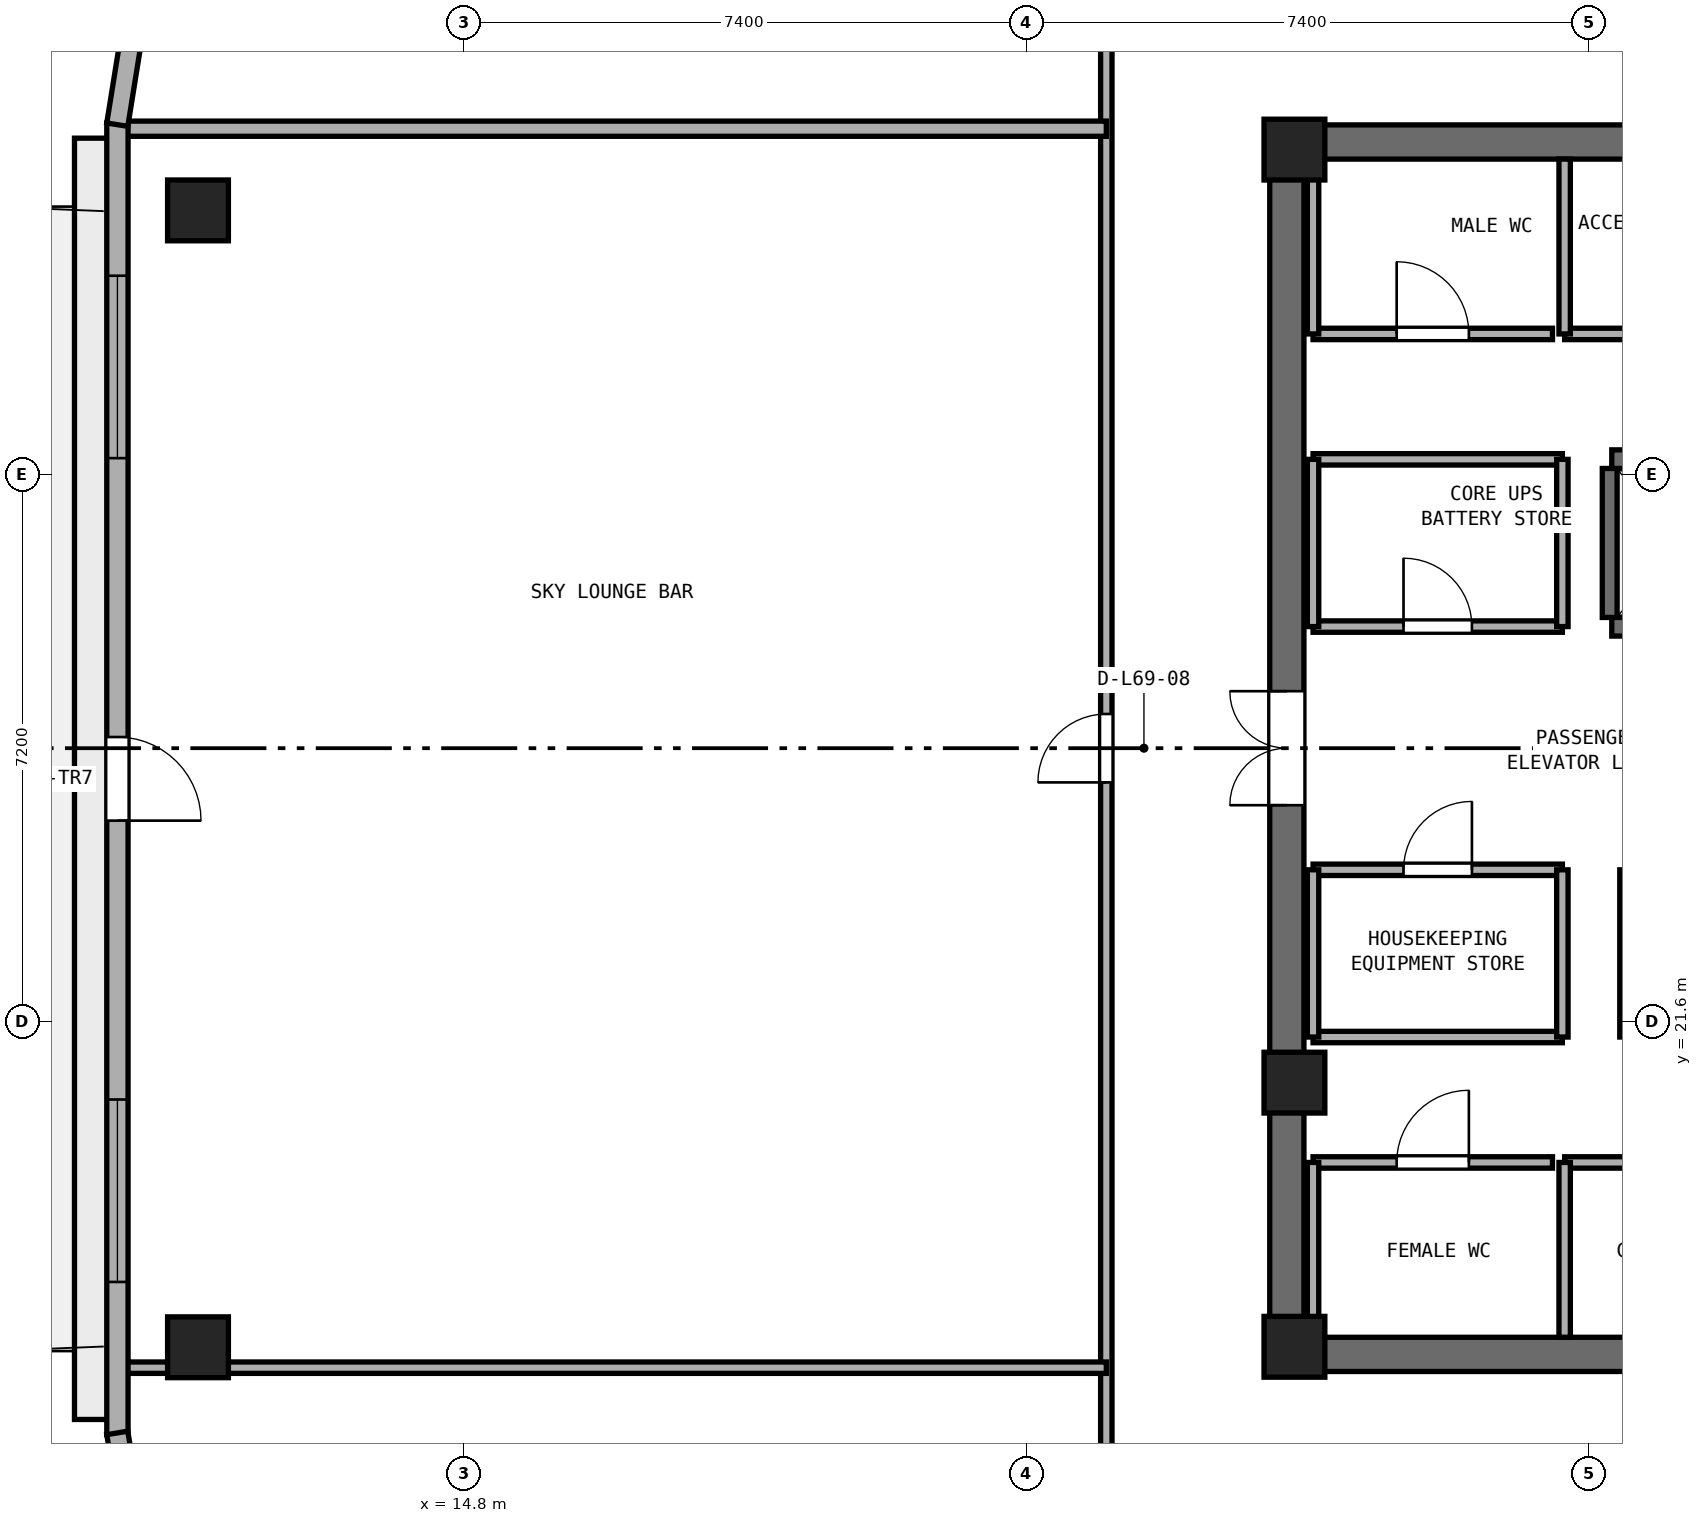
"""IFC4 building model, lengths in metres.
Left out: names, types, materials, properties, quantities, classifications, styles, units other than length and angle.
Written with IfcOpenShell. Run it as: python <this file> out.ifc"""

import sys

from ifc_helpers import new_model, si_unit, direction, frame, frame_2d, origin, origin_2d, place, context, subcontext, project, spatial, rectangle, extrude, element, fill, save


model = new_model("IFC4")
c1 = context("Model", 3, precision=1e-05, world=origin(), true_north=direction((0.0, 1.0)))
c2 = subcontext(c1, "Body", "Model", "MODEL_VIEW")
j1 = project(units=[si_unit("LENGTHUNIT", "METRE"), si_unit("PLANEANGLEUNIT", "RADIAN")], contexts=[c1])
p1 = place(None, origin())
s1 = spatial("IfcSite", under=j1, at=p1, CompositionType="ELEMENT")
p2 = place(p1, origin())
s2 = spatial("IfcBuilding", under=s1, at=p2, CompositionType="ELEMENT")
p3 = place(p2, frame((0.0, 0.0, 270.6)))
s3 = spatial("IfcBuildingStorey", under=s2, at=p3, CompositionType="ELEMENT", Elevation=270.6)
for number, where, z_axis, x_axis in (
    (1, (25.4, 17.225, 0.0), (0.0, 0.0, 1.0), (1.0, 0.0, 0.0)),
    (2, (25.4, 33.175, 0.0), (0.0, 0.0, 1.0), (1.0, 0.0, 0.0)),
):
    element("IfcWall", number, at=place(p3, frame(where, z_axis=z_axis, x_axis=x_axis)), inside=s3, PredefinedType="SHEAR", context=c2, shape_type="SweptSolid", body=[
        extrude(rectangle(XDim=23.2, YDim=0.45, at=frame_2d((11.6, 0.0))), origin(), (0.0, 0.0, 1.0), 3.54),
    ])
p4 = place(p3, frame((25.625, 17.45, 0.0), z_axis=(0.0, 0.0, 1.0), x_axis=(0.0, 1.0, 0.0)))
e3 = element("IfcWall", 3, at=p4, inside=s3, PredefinedType="SHEAR", context=c2, shape_type="SweptSolid", body=[
    extrude(rectangle(XDim=15.5, YDim=0.45, at=frame_2d((7.75, 0.0))), origin(), (0.0, 0.0, 1.0), 3.54),
])
p5 = place(p4, frame((7.0, 0.0, 0.0)))
e4 = element("IfcOpeningElement", 4, at=p5, cuts=e3, PredefinedType="OPENING", context=c2, shape_type="SweptSolid", body=[
    extrude(rectangle(XDim=1.5, YDim=2.15, at=frame_2d((0.75, 1.075))), frame((0.0, 0.235, 0.0), z_axis=(0.0, -1.0, 0.0), x_axis=(1.0, 0.0, 0.0)), (0.0, 0.0, 1.0), 0.47),
])
for number, where, z_axis, x_axis in (
    (5, (25.725, 17.325, 0.0), (0.0, 0.0, 1.0), (1.0, 0.0, 0.0)),
    (6, (25.725, 33.075, 0.0), (0.0, 0.0, 1.0), (1.0, 0.0, 0.0)),
    (7, (25.725, 20.8, 0.0), (0.0, 0.0, 1.0), (1.0, 0.0, 0.0)),
):
    element("IfcColumn", number, at=place(p3, frame(where, z_axis=z_axis, x_axis=x_axis)), inside=s3, PredefinedType="PILASTER", context=c2, shape_type="SweptSolid", body=[
        extrude(rectangle(XDim=0.8, YDim=0.8, at=origin_2d()), origin(), (0.0, 0.0, 1.0), 3.8),
    ])
for number, where, z_axis, x_axis in (
    (8, (11.3, 32.275, 0.0), (0.0, 0.0, 1.0), (1.0, 0.0, 0.0)),
    (9, (11.3, 17.319, 0.0), (0.0, 0.0, 1.0), (1.0, 0.0, 0.0)),
):
    element("IfcColumn", number, at=place(p3, frame(where, z_axis=z_axis, x_axis=x_axis)), inside=s3, PredefinedType="COLUMN", context=c2, shape_type="SweptSolid", body=[
        extrude(rectangle(XDim=0.8, YDim=0.8, at=origin_2d()), origin(), (0.0, 0.0, 1.0), 3.8),
    ])
p6 = place(p3, frame((29.9, 26.8, 0.0), z_axis=(0.0, 0.0, 1.0), x_axis=(1.0, 0.0, 0.0)))
e10 = element("IfcWall", 10, at=p6, inside=s3, PredefinedType="SHEAR", context=c2, shape_type="SweptSolid", body=[
    extrude(rectangle(XDim=1.72, YDim=0.25, at=frame_2d((0.86, 0.0))), origin(), (0.0, 0.0, 1.0), 3.54),
])
p7 = place(p6, frame((0.31, 0.0, 0.0)))
e11 = element("IfcOpeningElement", 11, at=p7, cuts=e10, PredefinedType="OPENING", context=c2, shape_type="SweptSolid", body=[
    extrude(rectangle(XDim=1.1, YDim=2.15, at=frame_2d((0.55, 1.075))), frame((0.0, 0.135, 0.0), z_axis=(0.0, -1.0, 0.0), x_axis=(1.0, 0.0, 0.0)), (0.0, 0.0, 1.0), 0.27),
])
p8 = place(p3, frame((29.9, 29.0, 0.0), z_axis=(0.0, 0.0, 1.0), x_axis=(1.0, 0.0, 0.0)))
e12 = element("IfcWall", 12, at=p8, inside=s3, PredefinedType="SHEAR", context=c2, shape_type="SweptSolid", body=[
    extrude(rectangle(XDim=1.72, YDim=0.25, at=frame_2d((0.86, 0.0))), origin(), (0.0, 0.0, 1.0), 3.54),
])
p9 = place(p3, frame((29.9, 26.92, 0.0), z_axis=(0.0, 0.0, 1.0), x_axis=(0.0, 1.0, 0.0)))
e13 = element("IfcWall", 13, at=p9, inside=s3, PredefinedType="SHEAR", context=c2, shape_type="SweptSolid", body=[
    extrude(rectangle(XDim=1.96, YDim=0.25, at=frame_2d((0.98, 0.0))), origin(), (0.0, 0.0, 1.0), 3.54),
])
p10 = place(p3, frame((25.97, 30.65, 0.0), z_axis=(0.0, 0.0, 1.0), x_axis=(1.0, 0.0, 0.0)))
e14 = element("IfcWall", 14, at=p10, inside=s3, PredefinedType="PARTITIONING", context=c2, shape_type="SweptSolid", body=[
    extrude(rectangle(XDim=3.15, YDim=0.15, at=frame_2d((1.575, 0.0))), origin(), (0.0, 0.0, 1.0), 3.54),
])
p11 = place(p10, frame((1.1, 0.0, 0.0)))
e15 = element("IfcOpeningElement", 15, at=p11, cuts=e14, PredefinedType="OPENING", context=c2, shape_type="SweptSolid", body=[
    extrude(rectangle(XDim=0.95, YDim=2.1, at=frame_2d((0.475, 1.05))), frame((0.0, 0.085, 0.0), z_axis=(0.0, -1.0, 0.0), x_axis=(1.0, 0.0, 0.0)), (0.0, 0.0, 1.0), 0.17),
])
p12 = place(p3, frame((25.97, 30.65, 0.0), z_axis=(0.0, 0.0, 1.0), x_axis=(0.0, 1.0, 0.0)))
e16 = element("IfcWall", 16, at=p12, inside=s3, PredefinedType="PARTITIONING", context=c2, shape_type="SweptSolid", body=[
    extrude(rectangle(XDim=2.3, YDim=0.15, at=frame_2d((1.15, 0.0))), origin(), (0.0, 0.0, 1.0), 2.64),
])
p13 = place(p3, frame((29.28, 30.65, 0.0), z_axis=(0.0, 0.0, 1.0), x_axis=(1.0, 0.0, 0.0)))
e17 = element("IfcWall", 17, at=p13, inside=s3, PredefinedType="PARTITIONING", context=c2, shape_type="SweptSolid", body=[
    extrude(rectangle(XDim=3.19, YDim=0.15, at=frame_2d((1.595, 0.0))), origin(), (0.0, 0.0, 1.0), 3.54),
])
p14 = place(p13, frame((1.12, 0.0, 0.0)))
e18 = element("IfcOpeningElement", 18, at=p14, cuts=e17, PredefinedType="OPENING", context=c2, shape_type="SweptSolid", body=[
    extrude(rectangle(XDim=0.95, YDim=2.1, at=frame_2d((0.475, 1.05))), frame((0.0, 0.085, 0.0), z_axis=(0.0, -1.0, 0.0), x_axis=(1.0, 0.0, 0.0)), (0.0, 0.0, 1.0), 0.17),
])
p15 = place(p3, frame((29.28, 30.65, 0.0), z_axis=(0.0, 0.0, 1.0), x_axis=(0.0, 1.0, 0.0)))
e19 = element("IfcWall", 19, at=p15, inside=s3, PredefinedType="PARTITIONING", context=c2, shape_type="SweptSolid", body=[
    extrude(rectangle(XDim=2.3, YDim=0.15, at=frame_2d((1.15, 0.0))), origin(), (0.0, 0.0, 1.0), 3.54),
])
p16 = place(p3, frame((25.97, 19.75, 0.0), z_axis=(0.0, 0.0, 1.0), x_axis=(1.0, 0.0, 0.0)))
e20 = element("IfcWall", 20, at=p16, inside=s3, PredefinedType="PARTITIONING", context=c2, shape_type="SweptSolid", body=[
    extrude(rectangle(XDim=3.15, YDim=0.15, at=frame_2d((1.575, 0.0))), origin(), (0.0, 0.0, 1.0), 3.54),
])
p17 = place(p16, frame((1.1, 0.0, 0.0)))
e21 = element("IfcOpeningElement", 21, at=p17, cuts=e20, PredefinedType="OPENING", context=c2, shape_type="SweptSolid", body=[
    extrude(rectangle(XDim=0.95, YDim=2.1, at=frame_2d((0.475, 1.05))), frame((0.0, 0.085, 0.0), z_axis=(0.0, -1.0, 0.0), x_axis=(1.0, 0.0, 0.0)), (0.0, 0.0, 1.0), 0.17),
])
p18 = place(p3, frame((25.97, 17.45, 0.0), z_axis=(0.0, 0.0, 1.0), x_axis=(0.0, 1.0, 0.0)))
e22 = element("IfcWall", 22, at=p18, inside=s3, PredefinedType="PARTITIONING", context=c2, shape_type="SweptSolid", body=[
    extrude(rectangle(XDim=2.3, YDim=0.15, at=frame_2d((1.15, 0.0))), origin(), (0.0, 0.0, 1.0), 2.64),
])
p19 = place(p3, frame((29.28, 19.75, 0.0), z_axis=(0.0, 0.0, 1.0), x_axis=(1.0, 0.0, 0.0)))
e23 = element("IfcWall", 23, at=p19, inside=s3, PredefinedType="PARTITIONING", context=c2, shape_type="SweptSolid", body=[
    extrude(rectangle(XDim=3.19, YDim=0.15, at=frame_2d((1.595, 0.0))), origin(), (0.0, 0.0, 1.0), 3.54),
])
p20 = place(p19, frame((1.145, 0.0, 0.0)))
e24 = element("IfcOpeningElement", 24, at=p20, cuts=e23, PredefinedType="OPENING", context=c2, shape_type="SweptSolid", body=[
    extrude(rectangle(XDim=0.9, YDim=2.1, at=frame_2d((0.45, 1.05))), frame((0.0, 0.085, 0.0), z_axis=(0.0, -1.0, 0.0), x_axis=(1.0, 0.0, 0.0)), (0.0, 0.0, 1.0), 0.17),
])
p21 = place(p3, frame((29.28, 17.45, 0.0), z_axis=(0.0, 0.0, 1.0), x_axis=(0.0, 1.0, 0.0)))
e25 = element("IfcWall", 25, at=p21, inside=s3, PredefinedType="PARTITIONING", context=c2, shape_type="SweptSolid", body=[
    extrude(rectangle(XDim=2.3, YDim=0.15, at=frame_2d((1.15, 0.0))), origin(), (0.0, 0.0, 1.0), 3.54),
])
p22 = place(p3, frame((25.97, 26.8, 0.0), z_axis=(0.0, 0.0, 1.0), x_axis=(1.0, 0.0, 0.0)))
e26 = element("IfcWall", 26, at=p22, inside=s3, PredefinedType="PARTITIONING", context=c2, shape_type="SweptSolid", body=[
    extrude(rectangle(XDim=3.28, YDim=0.15, at=frame_2d((1.64, 0.0))), origin(), (0.0, 0.0, 1.0), 3.54),
])
p23 = place(p22, frame((1.19, 0.0, 0.0)))
e27 = element("IfcOpeningElement", 27, at=p23, cuts=e26, PredefinedType="OPENING", context=c2, shape_type="SweptSolid", body=[
    extrude(rectangle(XDim=0.9, YDim=2.1, at=frame_2d((0.45, 1.05))), frame((0.0, 0.085, 0.0), z_axis=(0.0, -1.0, 0.0), x_axis=(1.0, 0.0, 0.0)), (0.0, 0.0, 1.0), 0.17),
])
p24 = place(p3, frame((25.97, 29.0, 0.0), z_axis=(0.0, 0.0, 1.0), x_axis=(1.0, 0.0, 0.0)))
e28 = element("IfcWall", 28, at=p24, inside=s3, PredefinedType="PARTITIONING", context=c2, shape_type="SweptSolid", body=[
    extrude(rectangle(XDim=3.28, YDim=0.15, at=frame_2d((1.64, 0.0))), origin(), (0.0, 0.0, 1.0), 3.54),
])
p25 = place(p3, frame((25.97, 26.8, 0.0), z_axis=(0.0, 0.0, 1.0), x_axis=(0.0, 1.0, 0.0)))
e29 = element("IfcWall", 29, at=p25, inside=s3, PredefinedType="PARTITIONING", context=c2, shape_type="SweptSolid", body=[
    extrude(rectangle(XDim=2.2, YDim=0.15, at=frame_2d((1.1, 0.0))), origin(), (0.0, 0.0, 1.0), 2.64),
])
p26 = place(p3, frame((29.25, 26.8, 0.0), z_axis=(0.0, 0.0, 1.0), x_axis=(0.0, 1.0, 0.0)))
e30 = element("IfcWall", 30, at=p26, inside=s3, PredefinedType="PARTITIONING", context=c2, shape_type="SweptSolid", body=[
    extrude(rectangle(XDim=2.2, YDim=0.15, at=frame_2d((1.1, 0.0))), origin(), (0.0, 0.0, 1.0), 3.54),
])
p27 = place(p3, frame((25.97, 21.4, 0.0), z_axis=(0.0, 0.0, 1.0), x_axis=(1.0, 0.0, 0.0)))
e31 = element("IfcWall", 31, at=p27, inside=s3, PredefinedType="PARTITIONING", context=c2, shape_type="SweptSolid", body=[
    extrude(rectangle(XDim=3.28, YDim=0.15, at=frame_2d((1.64, 0.0))), origin(), (0.0, 0.0, 1.0), 3.54),
])
p28 = place(p3, frame((25.97, 23.6, 0.0), z_axis=(0.0, 0.0, 1.0), x_axis=(1.0, 0.0, 0.0)))
e32 = element("IfcWall", 32, at=p28, inside=s3, PredefinedType="PARTITIONING", context=c2, shape_type="SweptSolid", body=[
    extrude(rectangle(XDim=3.28, YDim=0.15, at=frame_2d((1.64, 0.0))), origin(), (0.0, 0.0, 1.0), 3.54),
])
p29 = place(p28, frame((1.19, 0.0, 0.0)))
e33 = element("IfcOpeningElement", 33, at=p29, cuts=e32, PredefinedType="OPENING", context=c2, shape_type="SweptSolid", body=[
    extrude(rectangle(XDim=0.9, YDim=2.1, at=frame_2d((0.45, 1.05))), frame((0.0, 0.085, 0.0), z_axis=(0.0, -1.0, 0.0), x_axis=(1.0, 0.0, 0.0)), (0.0, 0.0, 1.0), 0.17),
])
p30 = place(p3, frame((25.97, 21.4, 0.0), z_axis=(0.0, 0.0, 1.0), x_axis=(0.0, 1.0, 0.0)))
e34 = element("IfcWall", 34, at=p30, inside=s3, PredefinedType="PARTITIONING", context=c2, shape_type="SweptSolid", body=[
    extrude(rectangle(XDim=2.2, YDim=0.15, at=frame_2d((1.1, 0.0))), origin(), (0.0, 0.0, 1.0), 2.64),
])
for number, where, z_axis, x_axis in (
    (35, (29.25, 21.4, 0.0), (0.0, 0.0, 1.0), (0.0, 1.0, 0.0)),
    (36, (30.08, 21.4, 0.0), (0.0, 0.0, 1.0), (0.0, 1.0, 0.0)),
):
    element("IfcWall", number, at=place(p3, frame(where, z_axis=z_axis, x_axis=x_axis)), inside=s3, PredefinedType="PARTITIONING", context=c2, shape_type="SweptSolid", body=[
        extrude(rectangle(XDim=2.2, YDim=0.15, at=frame_2d((1.1, 0.0))), origin(), (0.0, 0.0, 1.0), 3.54),
    ])
p31 = place(p3, frame((23.25, 14.85, 0.0), z_axis=(0.0, 0.0, 1.0), x_axis=(0.0, 1.0, 0.0)))
e37 = element("IfcWall", 37, at=p31, inside=s3, PredefinedType="PARTITIONING", context=c2, shape_type="SweptSolid", body=[
    extrude(rectangle(XDim=20.7, YDim=0.15, at=frame_2d((10.35, 0.0))), origin(), (0.0, 0.0, 1.0), 3.54),
])
p32 = place(p31, frame((9.9, 0.0, 0.0)))
e38 = element("IfcOpeningElement", 38, at=p32, cuts=e37, PredefinedType="OPENING", context=c2, shape_type="SweptSolid", body=[
    extrude(rectangle(XDim=0.9, YDim=2.1, at=frame_2d((0.45, 1.05))), frame((0.0, 0.085, 0.0), z_axis=(0.0, -1.0, 0.0), x_axis=(1.0, 0.0, 0.0)), (0.0, 0.0, 1.0), 0.17),
])
p33 = place(p3, frame((10.305, 17.05, 0.0), z_axis=(0.0, 0.0, 1.0), x_axis=(1.0, 0.0, 0.0)))
e39 = element("IfcWall", 39, at=p33, inside=s3, PredefinedType="PARTITIONING", context=c2, shape_type="SweptSolid", body=[
    extrude(rectangle(XDim=12.945, YDim=0.15, at=frame_2d((6.473, 0.0))), origin(), (0.0, 0.0, 1.0), 2.19),
])
p34 = place(p3, frame((10.305, 33.35, 0.0), z_axis=(0.0, 0.0, 1.0), x_axis=(1.0, 0.0, 0.0)))
e40 = element("IfcWall", 40, at=p34, inside=s3, PredefinedType="PARTITIONING", context=c2, shape_type="SweptSolid", body=[
    extrude(rectangle(XDim=12.945, YDim=0.2, at=frame_2d((6.473, 0.0))), origin(), (0.0, 0.0, 1.0), 2.19),
])
p35 = place(p3, frame((10.24, 33.425, 0.0), z_axis=(0.0, 0.0, 1.0), x_axis=(0.0, -1.0, 0.0)))
e41 = element("IfcWall", 41, at=p35, inside=s3, PredefinedType="STANDARD", context=c2, shape_type="SweptSolid", body=[
    extrude(rectangle(XDim=17.257, YDim=0.28, at=frame_2d((8.628, 0.0))), origin(), (0.0, 0.0, 1.0), 3.54),
])
p36 = place(p35, frame((8.078, 0.0, 0.0)))
e42 = element("IfcOpeningElement", 42, at=p36, cuts=e41, PredefinedType="OPENING", context=c2, shape_type="SweptSolid", body=[
    extrude(rectangle(XDim=1.1, YDim=2.2, at=frame_2d((0.55, 1.1))), frame((0.0, 0.15, 0.0), z_axis=(0.0, -1.0, 0.0), x_axis=(1.0, 0.0, 0.0)), (0.0, 0.0, 1.0), 0.3),
])
p37 = place(p35, frame((2.01, 0.0, 0.9)))
e43 = element("IfcOpeningElement", 43, at=p37, cuts=e41, PredefinedType="OPENING", context=c2, shape_type="SweptSolid", body=[
    extrude(rectangle(XDim=2.4, YDim=1.75, at=frame_2d((1.2, 0.875))), frame((0.0, 0.15, 0.0), z_axis=(0.0, -1.0, 0.0), x_axis=(1.0, 0.0, 0.0)), (0.0, 0.0, 1.0), 0.3),
])
p38 = place(p35, frame((12.847, 0.0, 0.9)))
e44 = element("IfcOpeningElement", 44, at=p38, cuts=e41, PredefinedType="OPENING", context=c2, shape_type="SweptSolid", body=[
    extrude(rectangle(XDim=2.4, YDim=1.75, at=frame_2d((1.2, 0.875))), frame((0.0, 0.15, 0.0), z_axis=(0.0, -1.0, 0.0), x_axis=(1.0, 0.0, 0.0)), (0.0, 0.0, 1.0), 0.3),
])
p39 = place(p3, frame((10.445, 34.688, 0.0), z_axis=(0.0, 0.0, 1.0), x_axis=(-0.158524605336, -0.987355027081, 0.0)))
e45 = element("IfcWall", 45, at=p39, inside=s3, PredefinedType="STANDARD", context=c2, shape_type="SweptSolid", body=[
    extrude(rectangle(XDim=1.301, YDim=0.28, at=frame_2d((0.651, 0.0))), origin(), (0.0, 0.0, 1.0), 3.54),
])
p40 = place(p3, frame((10.238, 16.192, 0.0), z_axis=(0.0, 0.0, 1.0), x_axis=(0.164604311367, -0.986359681191, 0.0)))
e46 = element("IfcWall", 46, at=p40, inside=s3, PredefinedType="STANDARD", context=c2, shape_type="SweptSolid", body=[
    extrude(rectangle(XDim=1.35, YDim=0.28, at=frame_2d((0.675, 0.0))), origin(), (0.0, 0.0, 1.0), 3.54),
])
p41 = place(p5, origin())
e47 = element("IfcDoor", 47, at=p41, inside=s3, OperationType="DOUBLE_DOOR_SINGLE_SWING", PredefinedType="DOOR", context=c2, shape_type="SweptSolid", body=[
    extrude(rectangle(XDim=1.5, YDim=2.15, at=frame_2d((0.75, 1.075))), frame((0.0, 0.025, 0.0), z_axis=(0.0, -1.0, 0.0), x_axis=(1.0, 0.0, 0.0)), (0.0, 0.0, 1.0), 0.05),
])
fill(e4, e47)
p42 = place(p11, origin())
e48 = element("IfcDoor", 48, at=p42, inside=s3, OperationType="SINGLE_SWING_LEFT", PredefinedType="DOOR", context=c2, shape_type="SweptSolid", body=[
    extrude(rectangle(XDim=0.95, YDim=2.1, at=frame_2d((0.475, 1.05))), frame((0.0, 0.025, 0.0), z_axis=(0.0, -1.0, 0.0), x_axis=(1.0, 0.0, 0.0)), (0.0, 0.0, 1.0), 0.05),
])
fill(e15, e48)
p43 = place(p17, origin())
e49 = element("IfcDoor", 49, at=p43, inside=s3, OperationType="SINGLE_SWING_RIGHT", PredefinedType="DOOR", context=c2, shape_type="SweptSolid", body=[
    extrude(rectangle(XDim=0.95, YDim=2.1, at=frame_2d((0.475, 1.05))), frame((0.0, 0.025, 0.0), z_axis=(0.0, -1.0, 0.0), x_axis=(1.0, 0.0, 0.0)), (0.0, 0.0, 1.0), 0.05),
])
fill(e21, e49)
p44 = place(p23, origin())
e50 = element("IfcDoor", 50, at=p44, inside=s3, OperationType="SINGLE_SWING_LEFT", PredefinedType="DOOR", context=c2, shape_type="SweptSolid", body=[
    extrude(rectangle(XDim=0.9, YDim=2.1, at=frame_2d((0.45, 1.05))), frame((0.0, 0.025, 0.0), z_axis=(0.0, -1.0, 0.0), x_axis=(1.0, 0.0, 0.0)), (0.0, 0.0, 1.0), 0.05),
])
fill(e27, e50)
p45 = place(p29, origin())
e51 = element("IfcDoor", 51, at=p45, inside=s3, OperationType="SINGLE_SWING_RIGHT", PredefinedType="DOOR", context=c2, shape_type="SweptSolid", body=[
    extrude(rectangle(XDim=0.9, YDim=2.1, at=frame_2d((0.45, 1.05))), frame((0.0, 0.025, 0.0), z_axis=(0.0, -1.0, 0.0), x_axis=(1.0, 0.0, 0.0)), (0.0, 0.0, 1.0), 0.05),
])
fill(e33, e51)
p46 = place(p32, origin())
e52 = element("IfcDoor", 52, at=p46, inside=s3, OperationType="SINGLE_SWING_LEFT", PredefinedType="DOOR", context=c2, shape_type="SweptSolid", body=[
    extrude(rectangle(XDim=0.9, YDim=2.1, at=frame_2d((0.45, 1.05))), frame((0.0, 0.025, 0.0), z_axis=(0.0, -1.0, 0.0), x_axis=(1.0, 0.0, 0.0)), (0.0, 0.0, 1.0), 0.05),
])
fill(e38, e52)
p47 = place(p36, origin())
e53 = element("IfcDoor", 53, at=p47, inside=s3, OperationType="SINGLE_SWING_RIGHT", PredefinedType="DOOR", context=c2, shape_type="SweptSolid", body=[
    extrude(rectangle(XDim=1.1, YDim=2.2, at=frame_2d((0.55, 1.1))), frame((0.0, 0.025, 0.0), z_axis=(0.0, -1.0, 0.0), x_axis=(1.0, 0.0, 0.0)), (0.0, 0.0, 1.0), 0.05),
])
fill(e42, e53)
p48 = place(p37, origin())
e54 = element("IfcWindow", 54, at=p48, inside=s3, PartitioningType="SINGLE_PANEL", PredefinedType="WINDOW", context=c2, shape_type="SweptSolid", body=[
    extrude(rectangle(XDim=2.4, YDim=1.75, at=frame_2d((1.2, 0.875))), frame((0.0, 0.03, 0.0), z_axis=(0.0, -1.0, 0.0), x_axis=(1.0, 0.0, 0.0)), (0.0, 0.0, 1.0), 0.06),
])
fill(e43, e54)
p49 = place(p38, origin())
e55 = element("IfcWindow", 55, at=p49, inside=s3, PartitioningType="SINGLE_PANEL", PredefinedType="WINDOW", context=c2, shape_type="SweptSolid", body=[
    extrude(rectangle(XDim=2.4, YDim=1.75, at=frame_2d((1.2, 0.875))), frame((0.0, 0.03, 0.0), z_axis=(0.0, -1.0, 0.0), x_axis=(1.0, 0.0, 0.0)), (0.0, 0.0, 1.0), 0.06),
])
fill(e44, e55)
save(model, sys.argv[1])
